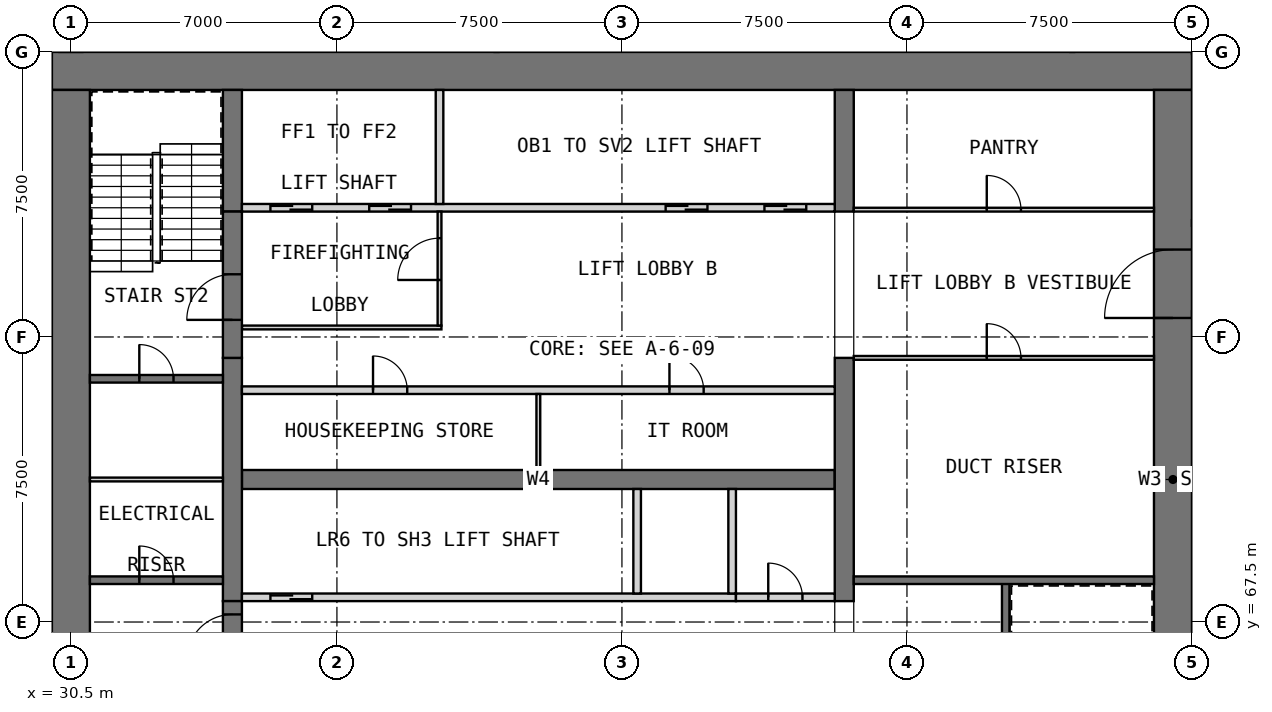
"""IFC4 building model, lengths in metres.
Left out: names, types, materials, properties, quantities, classifications, styles, units other than length and angle.
Written with IfcOpenShell. Run it as: python <this file> out.ifc"""

import sys

from ifc_helpers import new_model, si_unit, direction, frame, frame_2d, origin, place, context, subcontext, project, spatial, rectangle, extrude, element, fill, save


model = new_model("IFC4")
c1 = context("Model", 3, precision=1e-05, world=origin(), true_north=direction((0.0, 1.0)))
c2 = subcontext(c1, "Body", "Model", "MODEL_VIEW")
j1 = project(units=[si_unit("LENGTHUNIT", "METRE"), si_unit("PLANEANGLEUNIT", "RADIAN")], contexts=[c1])
p1 = place(None, origin())
s1 = spatial("IfcSite", under=j1, at=p1, CompositionType="ELEMENT")
p2 = place(p1, origin())
s2 = spatial("IfcBuilding", under=s1, at=p2, CompositionType="ELEMENT")
p3 = place(p2, frame((0.0, 0.0, 93.5)))
s3 = spatial("IfcBuildingStorey", under=s2, at=p3, CompositionType="ELEMENT", Elevation=93.5)
p4 = place(p3, frame((30.0, 82.0, 0.0), z_axis=(0.0, 0.0, 1.0), x_axis=(1.0, 0.0, 0.0)))
e1 = element("IfcWall", 1, at=p4, inside=s3, PredefinedType="SHEAR", context=c2, shape_type="SweptSolid", body=[
    extrude(rectangle(XDim=30.0, YDim=1.0, at=frame_2d((15.0, 0.0))), origin(), (0.0, 0.0, 1.0), 3.6),
])
p5 = place(p3, frame((30.5, 61.0, 0.0), z_axis=(0.0, 0.0, 1.0), x_axis=(0.0, 1.0, 0.0)))
e2 = element("IfcWall", 2, at=p5, inside=s3, PredefinedType="SHEAR", context=c2, shape_type="SweptSolid", body=[
    extrude(rectangle(XDim=20.5, YDim=1.0, at=frame_2d((10.25, 0.0))), origin(), (0.0, 0.0, 1.0), 3.6),
])
p6 = place(p3, frame((59.5, 61.0, 0.0), z_axis=(0.0, 0.0, 1.0), x_axis=(0.0, 1.0, 0.0)))
e3 = element("IfcWall", 3, at=p6, inside=s3, PredefinedType="SHEAR", context=c2, shape_type="SweptSolid", body=[
    extrude(rectangle(XDim=20.5, YDim=1.0, at=frame_2d((10.25, 0.0))), origin(), (0.0, 0.0, 1.0), 3.6),
])
p7 = place(p6, frame((14.5, 0.0, 0.0)))
e4 = element("IfcOpeningElement", 4, at=p7, cuts=e3, PredefinedType="OPENING", context=c2, shape_type="SweptSolid", body=[
    extrude(rectangle(XDim=1.8, YDim=2.1, at=frame_2d((0.9, 1.05))), frame((0.0, 0.51, 0.0), z_axis=(0.0, -1.0, 0.0), x_axis=(1.0, 0.0, 0.0)), (0.0, 0.0, 1.0), 1.02),
])
p8 = place(p3, frame((35.0, 71.25, 0.0), z_axis=(0.0, 0.0, 1.0), x_axis=(1.0, 0.0, 0.0)))
e5 = element("IfcWall", 5, at=p8, inside=s3, PredefinedType="SHEAR", context=c2, shape_type="SweptSolid", body=[
    extrude(rectangle(XDim=15.6, YDim=0.5, at=frame_2d((7.8, 0.0))), origin(), (0.0, 0.0, 1.0), 3.6),
])
p9 = place(p3, frame((34.75, 68.05, 0.0), z_axis=(0.0, 0.0, 1.0), x_axis=(0.0, 1.0, 0.0)))
e6 = element("IfcWall", 6, at=p9, inside=s3, PredefinedType="SHEAR", context=c2, shape_type="SweptSolid", body=[
    extrude(rectangle(XDim=6.4, YDim=0.5, at=frame_2d((3.2, 0.0))), origin(), (0.0, 0.0, 1.0), 3.6),
])
p10 = place(p3, frame((34.75, 78.3, 0.0), z_axis=(0.0, 0.0, 1.0), x_axis=(0.0, 1.0, 0.0)))
e7 = element("IfcWall", 7, at=p10, inside=s3, PredefinedType="SHEAR", context=c2, shape_type="SweptSolid", body=[
    extrude(rectangle(XDim=3.2, YDim=0.5, at=frame_2d((1.6, 0.0))), origin(), (0.0, 0.0, 1.0), 3.6),
])
p11 = place(p3, frame((50.85, 68.05, 0.0), z_axis=(0.0, 0.0, 1.0), x_axis=(0.0, 1.0, 0.0)))
e8 = element("IfcWall", 8, at=p11, inside=s3, PredefinedType="SHEAR", context=c2, shape_type="SweptSolid", body=[
    extrude(rectangle(XDim=6.4, YDim=0.5, at=frame_2d((3.2, 0.0))), origin(), (0.0, 0.0, 1.0), 3.6),
])
p12 = place(p3, frame((50.85, 78.3, 0.0), z_axis=(0.0, 0.0, 1.0), x_axis=(0.0, 1.0, 0.0)))
e9 = element("IfcWall", 9, at=p12, inside=s3, PredefinedType="SHEAR", context=c2, shape_type="SweptSolid", body=[
    extrude(rectangle(XDim=3.2, YDim=0.5, at=frame_2d((1.6, 0.0))), origin(), (0.0, 0.0, 1.0), 3.6),
])
p13 = place(p3, frame((35.0, 68.15, 0.0), z_axis=(0.0, 0.0, 1.0), x_axis=(1.0, 0.0, 0.0)))
e10 = element("IfcWall", 10, at=p13, inside=s3, PredefinedType="SOLIDWALL", context=c2, shape_type="SweptSolid", body=[
    extrude(rectangle(XDim=13.0, YDim=0.2, at=frame_2d((6.5, 0.0))), origin(), (0.0, 0.0, 1.0), 3.6),
])
p14 = place(p13, frame((0.75, 0.0, 0.0)))
e11 = element("IfcOpeningElement", 11, at=p14, cuts=e10, PredefinedType="OPENING", context=c2, shape_type="SweptSolid", body=[
    extrude(rectangle(XDim=1.1, YDim=2.1, at=frame_2d((0.55, 1.05))), frame((0.0, 0.11, 0.0), z_axis=(0.0, -1.0, 0.0), x_axis=(1.0, 0.0, 0.0)), (0.0, 0.0, 1.0), 0.22),
])
for number, where, z_axis, x_axis in (
    (12, (45.4, 68.25, 0.0), (0.0, 0.0, 1.0), (0.0, 1.0, 0.0)),
    (13, (47.9, 68.25, 0.0), (0.0, 0.0, 1.0), (0.0, 1.0, 0.0)),
):
    element("IfcWall", number, at=place(p3, frame(where, z_axis=z_axis, x_axis=x_axis)), inside=s3, PredefinedType="SOLIDWALL", context=c2, shape_type="SweptSolid", body=[
        extrude(rectangle(XDim=2.75, YDim=0.2, at=frame_2d((1.375, 0.0))), origin(), (0.0, 0.0, 1.0), 3.6),
    ])
p15 = place(p3, frame((48.0, 68.15, 0.0), z_axis=(0.0, 0.0, 1.0), x_axis=(1.0, 0.0, 0.0)))
e14 = element("IfcWall", 14, at=p15, inside=s3, PredefinedType="PARTITIONING", context=c2, shape_type="SweptSolid", body=[
    extrude(rectangle(XDim=2.6, YDim=0.2, at=frame_2d((1.3, 0.0))), origin(), (0.0, 0.0, 1.0), 3.35),
])
p16 = place(p15, frame((0.85, 0.0, 0.0)))
e15 = element("IfcOpeningElement", 15, at=p16, cuts=e14, PredefinedType="OPENING", context=c2, shape_type="SweptSolid", body=[
    extrude(rectangle(XDim=0.9, YDim=2.1, at=frame_2d((0.45, 1.05))), frame((0.0, 0.11, 0.0), z_axis=(0.0, -1.0, 0.0), x_axis=(1.0, 0.0, 0.0)), (0.0, 0.0, 1.0), 0.22),
])
p17 = place(p3, frame((35.0, 73.6, 0.0), z_axis=(0.0, 0.0, 1.0), x_axis=(1.0, 0.0, 0.0)))
e16 = element("IfcWall", 16, at=p17, inside=s3, PredefinedType="PARTITIONING", context=c2, shape_type="SweptSolid", body=[
    extrude(rectangle(XDim=15.6, YDim=0.2, at=frame_2d((7.8, 0.0))), origin(), (0.0, 0.0, 1.0), 3.35),
])
p18 = place(p17, frame((3.45, 0.0, 0.0)))
e17 = element("IfcOpeningElement", 17, at=p18, cuts=e16, PredefinedType="OPENING", context=c2, shape_type="SweptSolid", body=[
    extrude(rectangle(XDim=0.9, YDim=2.1, at=frame_2d((0.45, 1.05))), frame((0.0, 0.11, 0.0), z_axis=(0.0, -1.0, 0.0), x_axis=(1.0, 0.0, 0.0)), (0.0, 0.0, 1.0), 0.22),
])
p19 = place(p17, frame((11.25, 0.0, 0.0)))
e18 = element("IfcOpeningElement", 18, at=p19, cuts=e16, PredefinedType="OPENING", context=c2, shape_type="SweptSolid", body=[
    extrude(rectangle(XDim=0.9, YDim=2.1, at=frame_2d((0.45, 1.05))), frame((0.0, 0.11, 0.0), z_axis=(0.0, -1.0, 0.0), x_axis=(1.0, 0.0, 0.0)), (0.0, 0.0, 1.0), 0.22),
])
p20 = place(p3, frame((42.8, 71.5, 0.0), z_axis=(0.0, 0.0, 1.0), x_axis=(0.0, 1.0, 0.0)))
e19 = element("IfcWall", 19, at=p20, inside=s3, PredefinedType="PARTITIONING", context=c2, shape_type="SweptSolid", body=[
    extrude(rectangle(XDim=2.0, YDim=0.1, at=frame_2d((1.0, 0.0))), origin(), (0.0, 0.0, 1.0), 3.35),
])
p21 = place(p3, frame((35.0, 78.4, 0.0), z_axis=(0.0, 0.0, 1.0), x_axis=(1.0, 0.0, 0.0)))
e20 = element("IfcWall", 20, at=p21, inside=s3, PredefinedType="SOLIDWALL", context=c2, shape_type="SweptSolid", body=[
    extrude(rectangle(XDim=15.6, YDim=0.2, at=frame_2d((7.8, 0.0))), origin(), (0.0, 0.0, 1.0), 3.6),
])
p22 = place(p21, frame((0.75, 0.0, 0.0)))
e21 = element("IfcOpeningElement", 21, at=p22, cuts=e20, PredefinedType="OPENING", context=c2, shape_type="SweptSolid", body=[
    extrude(rectangle(XDim=1.1, YDim=2.1, at=frame_2d((0.55, 1.05))), frame((0.0, 0.11, 0.0), z_axis=(0.0, -1.0, 0.0), x_axis=(1.0, 0.0, 0.0)), (0.0, 0.0, 1.0), 0.22),
])
p23 = place(p21, frame((3.35, 0.0, 0.0)))
e22 = element("IfcOpeningElement", 22, at=p23, cuts=e20, PredefinedType="OPENING", context=c2, shape_type="SweptSolid", body=[
    extrude(rectangle(XDim=1.1, YDim=2.1, at=frame_2d((0.55, 1.05))), frame((0.0, 0.11, 0.0), z_axis=(0.0, -1.0, 0.0), x_axis=(1.0, 0.0, 0.0)), (0.0, 0.0, 1.0), 0.22),
])
p24 = place(p21, frame((11.15, 0.0, 0.0)))
e23 = element("IfcOpeningElement", 23, at=p24, cuts=e20, PredefinedType="OPENING", context=c2, shape_type="SweptSolid", body=[
    extrude(rectangle(XDim=1.1, YDim=2.1, at=frame_2d((0.55, 1.05))), frame((0.0, 0.11, 0.0), z_axis=(0.0, -1.0, 0.0), x_axis=(1.0, 0.0, 0.0)), (0.0, 0.0, 1.0), 0.22),
])
p25 = place(p21, frame((13.75, 0.0, 0.0)))
e24 = element("IfcOpeningElement", 24, at=p25, cuts=e20, PredefinedType="OPENING", context=c2, shape_type="SweptSolid", body=[
    extrude(rectangle(XDim=1.1, YDim=2.1, at=frame_2d((0.55, 1.05))), frame((0.0, 0.11, 0.0), z_axis=(0.0, -1.0, 0.0), x_axis=(1.0, 0.0, 0.0)), (0.0, 0.0, 1.0), 0.22),
])
p26 = place(p3, frame((40.2, 78.5, 0.0), z_axis=(0.0, 0.0, 1.0), x_axis=(0.0, 1.0, 0.0)))
e25 = element("IfcWall", 25, at=p26, inside=s3, PredefinedType="SOLIDWALL", context=c2, shape_type="SweptSolid", body=[
    extrude(rectangle(XDim=3.0, YDim=0.2, at=frame_2d((1.5, 0.0))), origin(), (0.0, 0.0, 1.0), 3.6),
])
p27 = place(p3, frame((35.0, 75.25, 0.0), z_axis=(0.0, 0.0, 1.0), x_axis=(1.0, 0.0, 0.0)))
e26 = element("IfcWall", 26, at=p27, inside=s3, PredefinedType="PARTITIONING", context=c2, shape_type="SweptSolid", body=[
    extrude(rectangle(XDim=5.25, YDim=0.1, at=frame_2d((2.625, 0.0))), origin(), (0.0, 0.0, 1.0), 3.35),
])
p28 = place(p3, frame((40.2, 75.3, 0.0), z_axis=(0.0, 0.0, 1.0), x_axis=(0.0, 1.0, 0.0)))
e27 = element("IfcWall", 27, at=p28, inside=s3, PredefinedType="PARTITIONING", context=c2, shape_type="SweptSolid", body=[
    extrude(rectangle(XDim=3.0, YDim=0.1, at=frame_2d((1.5, 0.0))), origin(), (0.0, 0.0, 1.0), 3.35),
])
p29 = place(p28, frame((1.2, 0.0, 0.0)))
e28 = element("IfcOpeningElement", 28, at=p29, cuts=e27, PredefinedType="OPENING", context=c2, shape_type="SweptSolid", body=[
    extrude(rectangle(XDim=1.1, YDim=2.1, at=frame_2d((0.55, 1.05))), frame((0.0, 0.06, 0.0), z_axis=(0.0, -1.0, 0.0), x_axis=(1.0, 0.0, 0.0)), (0.0, 0.0, 1.0), 0.12),
])
p30 = place(p3, frame((34.75, 64.2, 0.0), z_axis=(0.0, 0.0, 1.0), x_axis=(0.0, 1.0, 0.0)))
e29 = element("IfcWall", 29, at=p30, inside=s3, PredefinedType="SOLIDWALL", context=c2, shape_type="SweptSolid", body=[
    extrude(rectangle(XDim=3.85, YDim=0.5, at=frame_2d((1.925, 0.0))), origin(), (0.0, 0.0, 1.0), 2.4),
])
p31 = place(p30, frame((2.3, 0.0, 0.0)))
e30 = element("IfcOpeningElement", 30, at=p31, cuts=e29, PredefinedType="OPENING", context=c2, shape_type="SweptSolid", body=[
    extrude(rectangle(XDim=1.2, YDim=2.1, at=frame_2d((0.6, 1.05))), frame((0.0, 0.26, 0.0), z_axis=(0.0, -1.0, 0.0), x_axis=(1.0, 0.0, 0.0)), (0.0, 0.0, 1.0), 0.52),
])
p32 = place(p3, frame((34.75, 74.45, 0.0), z_axis=(0.0, 0.0, 1.0), x_axis=(0.0, 1.0, 0.0)))
e31 = element("IfcWall", 31, at=p32, inside=s3, PredefinedType="SOLIDWALL", context=c2, shape_type="SweptSolid", body=[
    extrude(rectangle(XDim=3.85, YDim=0.5, at=frame_2d((1.925, 0.0))), origin(), (0.0, 0.0, 1.0), 2.4),
])
p33 = place(p32, frame((1.0, 0.0, 0.0)))
e32 = element("IfcOpeningElement", 32, at=p33, cuts=e31, PredefinedType="OPENING", context=c2, shape_type="SweptSolid", body=[
    extrude(rectangle(XDim=1.2, YDim=2.1, at=frame_2d((0.6, 1.05))), frame((0.0, 0.26, 0.0), z_axis=(0.0, -1.0, 0.0), x_axis=(1.0, 0.0, 0.0)), (0.0, 0.0, 1.0), 0.52),
])
p34 = place(p3, frame((31.0, 68.6, 0.0), z_axis=(0.0, 0.0, 1.0), x_axis=(1.0, 0.0, 0.0)))
e33 = element("IfcWall", 33, at=p34, inside=s3, PredefinedType="SOLIDWALL", context=c2, shape_type="SweptSolid", body=[
    extrude(rectangle(XDim=3.5, YDim=0.2, at=frame_2d((1.75, 0.0))), origin(), (0.0, 0.0, 1.0), 3.35),
])
p35 = place(p34, frame((1.3, 0.0, 0.0)))
e34 = element("IfcOpeningElement", 34, at=p35, cuts=e33, PredefinedType="OPENING", context=c2, shape_type="SweptSolid", body=[
    extrude(rectangle(XDim=0.9, YDim=2.1, at=frame_2d((0.45, 1.05))), frame((0.0, 0.11, 0.0), z_axis=(0.0, -1.0, 0.0), x_axis=(1.0, 0.0, 0.0)), (0.0, 0.0, 1.0), 0.22),
])
p36 = place(p3, frame((31.0, 73.9, 0.0), z_axis=(0.0, 0.0, 1.0), x_axis=(1.0, 0.0, 0.0)))
e35 = element("IfcWall", 35, at=p36, inside=s3, PredefinedType="SOLIDWALL", context=c2, shape_type="SweptSolid", body=[
    extrude(rectangle(XDim=3.5, YDim=0.2, at=frame_2d((1.75, 0.0))), origin(), (0.0, 0.0, 1.0), 3.35),
])
p37 = place(p36, frame((1.3, 0.0, 0.0)))
e36 = element("IfcOpeningElement", 36, at=p37, cuts=e35, PredefinedType="OPENING", context=c2, shape_type="SweptSolid", body=[
    extrude(rectangle(XDim=0.9, YDim=2.1, at=frame_2d((0.45, 1.05))), frame((0.0, 0.11, 0.0), z_axis=(0.0, -1.0, 0.0), x_axis=(1.0, 0.0, 0.0)), (0.0, 0.0, 1.0), 0.22),
])
p38 = place(p3, frame((55.1, 61.0, 0.0), z_axis=(0.0, 0.0, 1.0), x_axis=(0.0, 1.0, 0.0)))
e37 = element("IfcWall", 37, at=p38, inside=s3, PredefinedType="SOLIDWALL", context=c2, shape_type="SweptSolid", body=[
    extrude(rectangle(XDim=7.6, YDim=0.2, at=frame_2d((3.8, 0.0))), origin(), (0.0, 0.0, 1.0), 3.35),
])
p39 = place(p3, frame((51.1, 68.6, 0.0), z_axis=(0.0, 0.0, 1.0), x_axis=(1.0, 0.0, 0.0)))
e38 = element("IfcWall", 38, at=p39, inside=s3, PredefinedType="SOLIDWALL", context=c2, shape_type="SweptSolid", body=[
    extrude(rectangle(XDim=7.9, YDim=0.2, at=frame_2d((3.95, 0.0))), origin(), (0.0, 0.0, 1.0), 3.35),
])
p40 = place(p3, frame((31.0, 71.25, 0.0), z_axis=(0.0, 0.0, 1.0), x_axis=(1.0, 0.0, 0.0)))
e39 = element("IfcWall", 39, at=p40, inside=s3, PredefinedType="PARTITIONING", context=c2, shape_type="SweptSolid", body=[
    extrude(rectangle(XDim=3.5, YDim=0.1, at=frame_2d((1.75, 0.0))), origin(), (0.0, 0.0, 1.0), 3.35),
])
p41 = place(p3, frame((51.1, 74.45, 0.0), z_axis=(0.0, 0.0, 1.0), x_axis=(1.0, 0.0, 0.0)))
e40 = element("IfcWall", 40, at=p41, inside=s3, PredefinedType="PARTITIONING", context=c2, shape_type="SweptSolid", body=[
    extrude(rectangle(XDim=7.9, YDim=0.1, at=frame_2d((3.95, 0.0))), origin(), (0.0, 0.0, 1.0), 3.35),
])
p42 = place(p41, frame((3.5, 0.0, 0.0)))
e41 = element("IfcOpeningElement", 41, at=p42, cuts=e40, PredefinedType="OPENING", context=c2, shape_type="SweptSolid", body=[
    extrude(rectangle(XDim=0.9, YDim=2.1, at=frame_2d((0.45, 1.05))), frame((0.0, 0.06, 0.0), z_axis=(0.0, -1.0, 0.0), x_axis=(1.0, 0.0, 0.0)), (0.0, 0.0, 1.0), 0.12),
])
p43 = place(p3, frame((51.1, 78.35, 0.0), z_axis=(0.0, 0.0, 1.0), x_axis=(1.0, 0.0, 0.0)))
e42 = element("IfcWall", 42, at=p43, inside=s3, PredefinedType="PARTITIONING", context=c2, shape_type="SweptSolid", body=[
    extrude(rectangle(XDim=7.9, YDim=0.1, at=frame_2d((3.95, 0.0))), origin(), (0.0, 0.0, 1.0), 3.35),
])
p44 = place(p43, frame((3.5, 0.0, 0.0)))
e43 = element("IfcOpeningElement", 43, at=p44, cuts=e42, PredefinedType="OPENING", context=c2, shape_type="SweptSolid", body=[
    extrude(rectangle(XDim=0.9, YDim=2.1, at=frame_2d((0.45, 1.05))), frame((0.0, 0.06, 0.0), z_axis=(0.0, -1.0, 0.0), x_axis=(1.0, 0.0, 0.0)), (0.0, 0.0, 1.0), 0.12),
])
p45 = place(p3, frame((60.0, 82.5, 0.0), z_axis=(0.0, 0.0, 1.0), x_axis=(1.0, 0.0, 0.0)))
e44 = element("IfcWall", 44, at=p45, inside=s3, PredefinedType="PARTITIONING", context=c2, shape_type="SweptSolid", body=[
    extrude(rectangle(XDim=14.925, YDim=0.1, at=frame_2d((7.462, 0.0))), origin(), (0.0, 0.0, 1.0), 3.35),
])
for number, where, z_axis, x_axis in (
    (45, (41.7, 82.5, 0.0), (0.0, 0.0, 1.0), (0.0, 1.0, 0.0)),
    (46, (56.85, 82.5, 0.0), (0.0, 0.0, 1.0), (0.0, 1.0, 0.0)),
):
    element("IfcWall", number, at=place(p3, frame(where, z_axis=z_axis, x_axis=x_axis)), inside=s3, PredefinedType="PARTITIONING", context=c2, shape_type="SweptSolid", body=[
        extrude(rectangle(XDim=7.425, YDim=0.1, at=frame_2d((3.712, 0.0))), origin(), (0.0, 0.0, 1.0), 3.35),
    ])
p46 = place(p14, origin())
e47 = element("IfcDoor", 47, at=p46, inside=s3, OperationType="DOUBLE_DOOR_SLIDING", PredefinedType="DOOR", context=c2, shape_type="SweptSolid", body=[
    extrude(rectangle(XDim=1.1, YDim=2.1, at=frame_2d((0.55, 1.05))), frame((0.0, 0.025, 0.0), z_axis=(0.0, -1.0, 0.0), x_axis=(1.0, 0.0, 0.0)), (0.0, 0.0, 1.0), 0.05),
])
fill(e11, e47)
p47 = place(p16, origin())
e48 = element("IfcDoor", 48, at=p47, inside=s3, OperationType="SINGLE_SWING_RIGHT", PredefinedType="DOOR", context=c2, shape_type="SweptSolid", body=[
    extrude(rectangle(XDim=0.9, YDim=2.1, at=frame_2d((0.45, 1.05))), frame((0.0, 0.025, 0.0), z_axis=(0.0, -1.0, 0.0), x_axis=(1.0, 0.0, 0.0)), (0.0, 0.0, 1.0), 0.05),
])
fill(e15, e48)
p48 = place(p18, origin())
e49 = element("IfcDoor", 49, at=p48, inside=s3, OperationType="SINGLE_SWING_RIGHT", PredefinedType="DOOR", context=c2, shape_type="SweptSolid", body=[
    extrude(rectangle(XDim=0.9, YDim=2.1, at=frame_2d((0.45, 1.05))), frame((0.0, 0.025, 0.0), z_axis=(0.0, -1.0, 0.0), x_axis=(1.0, 0.0, 0.0)), (0.0, 0.0, 1.0), 0.05),
])
fill(e17, e49)
p49 = place(p19, origin())
e50 = element("IfcDoor", 50, at=p49, inside=s3, OperationType="SINGLE_SWING_LEFT", PredefinedType="DOOR", context=c2, shape_type="SweptSolid", body=[
    extrude(rectangle(XDim=0.9, YDim=2.1, at=frame_2d((0.45, 1.05))), frame((0.0, 0.025, 0.0), z_axis=(0.0, -1.0, 0.0), x_axis=(1.0, 0.0, 0.0)), (0.0, 0.0, 1.0), 0.05),
])
fill(e18, e50)
p50 = place(p22, origin())
e51 = element("IfcDoor", 51, at=p50, inside=s3, OperationType="DOUBLE_DOOR_SLIDING", PredefinedType="DOOR", context=c2, shape_type="SweptSolid", body=[
    extrude(rectangle(XDim=1.1, YDim=2.1, at=frame_2d((0.55, 1.05))), frame((0.0, 0.025, 0.0), z_axis=(0.0, -1.0, 0.0), x_axis=(1.0, 0.0, 0.0)), (0.0, 0.0, 1.0), 0.05),
])
fill(e21, e51)
p51 = place(p23, origin())
e52 = element("IfcDoor", 52, at=p51, inside=s3, OperationType="DOUBLE_DOOR_SLIDING", PredefinedType="DOOR", context=c2, shape_type="SweptSolid", body=[
    extrude(rectangle(XDim=1.1, YDim=2.1, at=frame_2d((0.55, 1.05))), frame((0.0, 0.025, 0.0), z_axis=(0.0, -1.0, 0.0), x_axis=(1.0, 0.0, 0.0)), (0.0, 0.0, 1.0), 0.05),
])
fill(e22, e52)
p52 = place(p24, origin())
e53 = element("IfcDoor", 53, at=p52, inside=s3, OperationType="DOUBLE_DOOR_SLIDING", PredefinedType="DOOR", context=c2, shape_type="SweptSolid", body=[
    extrude(rectangle(XDim=1.1, YDim=2.1, at=frame_2d((0.55, 1.05))), frame((0.0, 0.025, 0.0), z_axis=(0.0, -1.0, 0.0), x_axis=(1.0, 0.0, 0.0)), (0.0, 0.0, 1.0), 0.05),
])
fill(e23, e53)
p53 = place(p25, origin())
e54 = element("IfcDoor", 54, at=p53, inside=s3, OperationType="DOUBLE_DOOR_SLIDING", PredefinedType="DOOR", context=c2, shape_type="SweptSolid", body=[
    extrude(rectangle(XDim=1.1, YDim=2.1, at=frame_2d((0.55, 1.05))), frame((0.0, 0.025, 0.0), z_axis=(0.0, -1.0, 0.0), x_axis=(1.0, 0.0, 0.0)), (0.0, 0.0, 1.0), 0.05),
])
fill(e24, e54)
p54 = place(p7, origin())
e55 = element("IfcDoor", 55, at=p54, inside=s3, OperationType="DOUBLE_DOOR_SINGLE_SWING", PredefinedType="DOOR", context=c2, shape_type="SweptSolid", body=[
    extrude(rectangle(XDim=1.8, YDim=2.1, at=frame_2d((0.9, 1.05))), frame((0.0, 0.025, 0.0), z_axis=(0.0, -1.0, 0.0), x_axis=(1.0, 0.0, 0.0)), (0.0, 0.0, 1.0), 0.05),
])
fill(e4, e55)
p55 = place(p29, origin())
e56 = element("IfcDoor", 56, at=p55, inside=s3, OperationType="SINGLE_SWING_LEFT", PredefinedType="DOOR", context=c2, shape_type="SweptSolid", body=[
    extrude(rectangle(XDim=1.1, YDim=2.1, at=frame_2d((0.55, 1.05))), frame((0.0, 0.025, 0.0), z_axis=(0.0, -1.0, 0.0), x_axis=(1.0, 0.0, 0.0)), (0.0, 0.0, 1.0), 0.05),
])
fill(e28, e56)
p56 = place(p31, origin())
e57 = element("IfcDoor", 57, at=p56, inside=s3, OperationType="SINGLE_SWING_LEFT", PredefinedType="DOOR", context=c2, shape_type="SweptSolid", body=[
    extrude(rectangle(XDim=1.2, YDim=2.1, at=frame_2d((0.6, 1.05))), frame((0.0, 0.025, 0.0), z_axis=(0.0, -1.0, 0.0), x_axis=(1.0, 0.0, 0.0)), (0.0, 0.0, 1.0), 0.05),
])
fill(e30, e57)
p57 = place(p33, origin())
e58 = element("IfcDoor", 58, at=p57, inside=s3, OperationType="SINGLE_SWING_RIGHT", PredefinedType="DOOR", context=c2, shape_type="SweptSolid", body=[
    extrude(rectangle(XDim=1.2, YDim=2.1, at=frame_2d((0.6, 1.05))), frame((0.0, 0.025, 0.0), z_axis=(0.0, -1.0, 0.0), x_axis=(1.0, 0.0, 0.0)), (0.0, 0.0, 1.0), 0.05),
])
fill(e32, e58)
p58 = place(p35, origin())
e59 = element("IfcDoor", 59, at=p58, inside=s3, OperationType="SINGLE_SWING_LEFT", PredefinedType="DOOR", context=c2, shape_type="SweptSolid", body=[
    extrude(rectangle(XDim=0.9, YDim=2.1, at=frame_2d((0.45, 1.05))), frame((0.0, 0.025, 0.0), z_axis=(0.0, -1.0, 0.0), x_axis=(1.0, 0.0, 0.0)), (0.0, 0.0, 1.0), 0.05),
])
fill(e34, e59)
p59 = place(p37, origin())
e60 = element("IfcDoor", 60, at=p59, inside=s3, OperationType="SINGLE_SWING_RIGHT", PredefinedType="DOOR", context=c2, shape_type="SweptSolid", body=[
    extrude(rectangle(XDim=0.9, YDim=2.1, at=frame_2d((0.45, 1.05))), frame((0.0, 0.025, 0.0), z_axis=(0.0, -1.0, 0.0), x_axis=(1.0, 0.0, 0.0)), (0.0, 0.0, 1.0), 0.05),
])
fill(e36, e60)
p60 = place(p42, origin())
e61 = element("IfcDoor", 61, at=p60, inside=s3, OperationType="SINGLE_SWING_RIGHT", PredefinedType="DOOR", context=c2, shape_type="SweptSolid", body=[
    extrude(rectangle(XDim=0.9, YDim=2.1, at=frame_2d((0.45, 1.05))), frame((0.0, 0.025, 0.0), z_axis=(0.0, -1.0, 0.0), x_axis=(1.0, 0.0, 0.0)), (0.0, 0.0, 1.0), 0.05),
])
fill(e41, e61)
p61 = place(p44, origin())
e62 = element("IfcDoor", 62, at=p61, inside=s3, OperationType="SINGLE_SWING_RIGHT", PredefinedType="DOOR", context=c2, shape_type="SweptSolid", body=[
    extrude(rectangle(XDim=0.9, YDim=2.1, at=frame_2d((0.45, 1.05))), frame((0.0, 0.025, 0.0), z_axis=(0.0, -1.0, 0.0), x_axis=(1.0, 0.0, 0.0)), (0.0, 0.0, 1.0), 0.05),
])
fill(e43, e62)
save(model, sys.argv[1])
